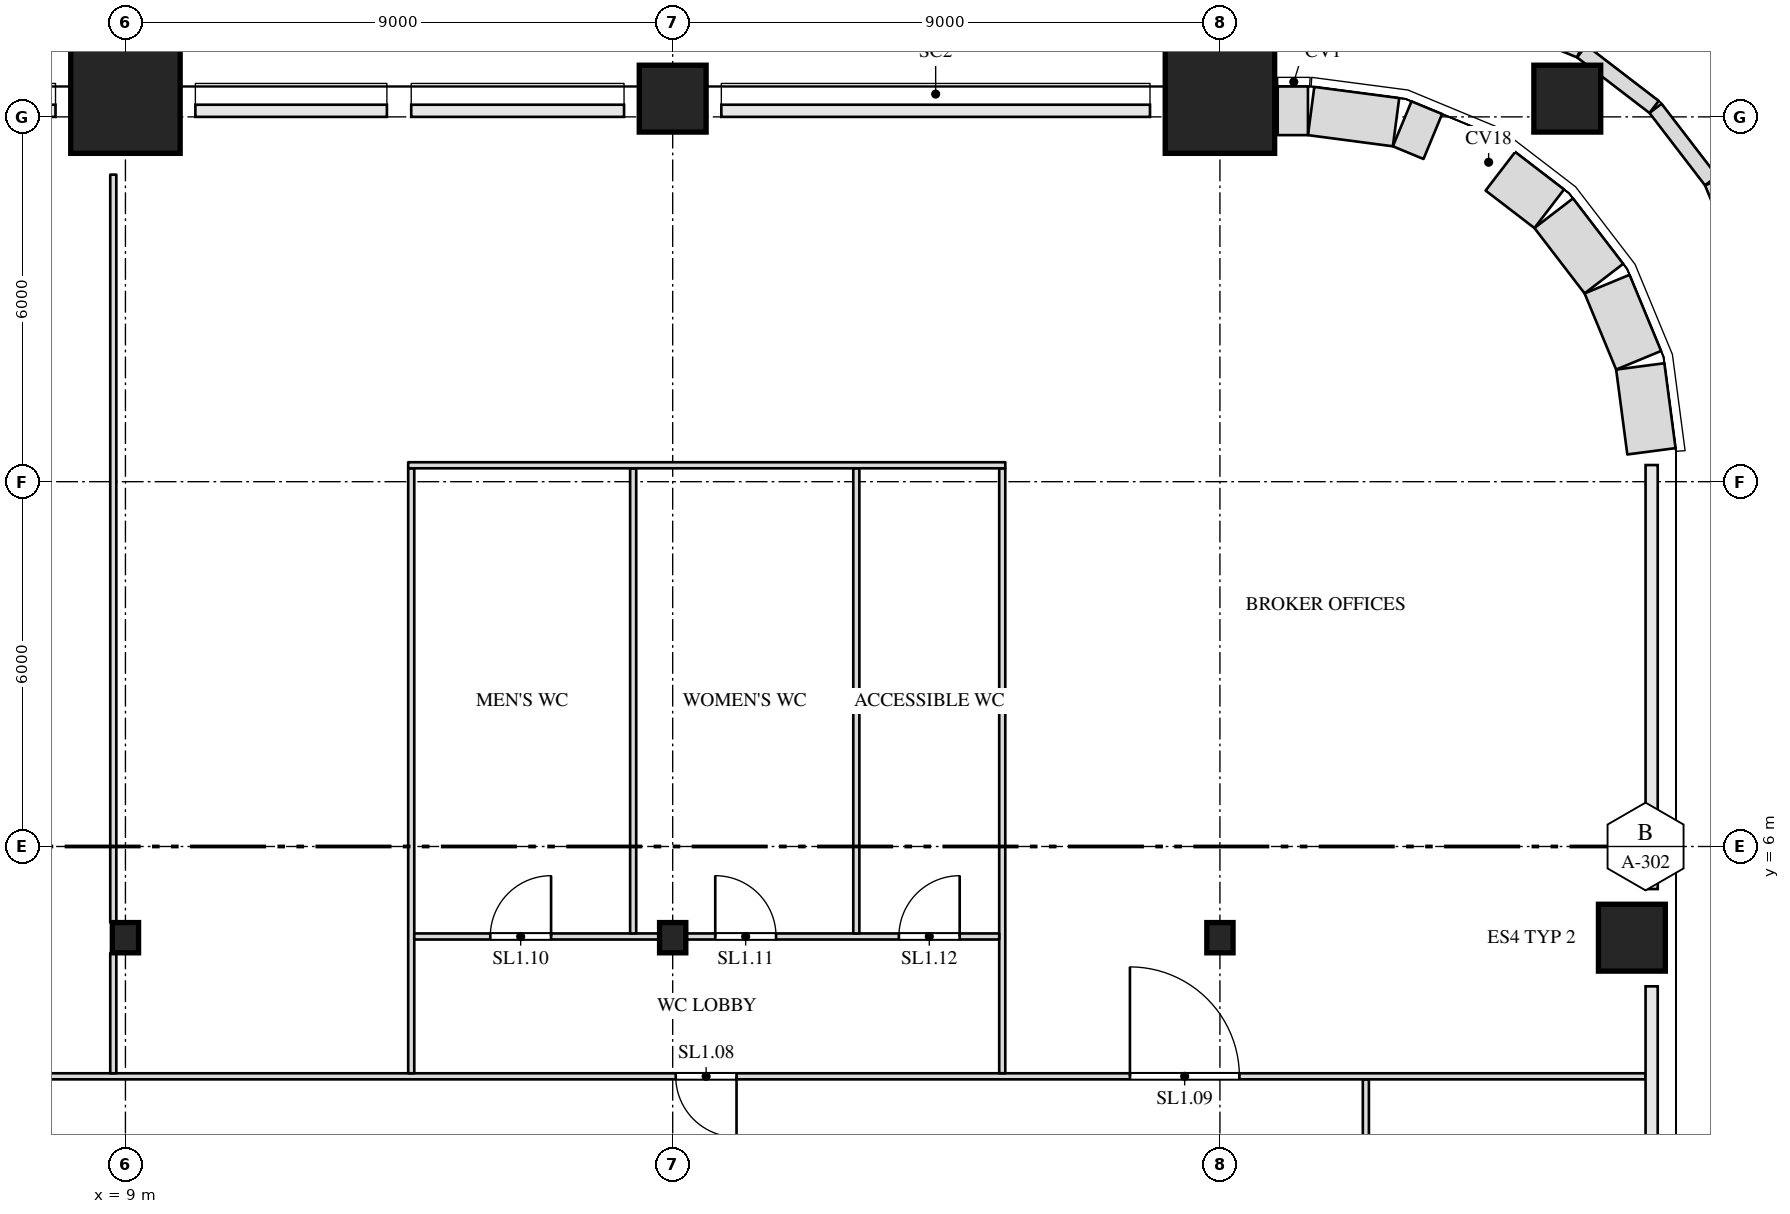
"""IFC4 building model, lengths in metres.
Left out: names, types, materials, properties, quantities, classifications, styles, units other than length and angle.
Written with IfcOpenShell. Run it as: python <this file> out.ifc"""

import sys

from ifc_helpers import new_model, si_unit, direction, frame, frame_2d, origin, origin_2d, place, context, subcontext, project, spatial, rectangle, i_section, extrude, clip, halfspace, element, fill, save


model = new_model("IFC4")
c1 = context("Model", 3, precision=1e-05, world=origin(), true_north=direction((0.0, 1.0)))
c2 = subcontext(c1, "Body", "Model", "MODEL_VIEW")
j1 = project(units=[si_unit("LENGTHUNIT", "METRE"), si_unit("PLANEANGLEUNIT", "RADIAN")], contexts=[c1])
p1 = place(None, origin())
s1 = spatial("IfcSite", under=j1, at=p1, CompositionType="ELEMENT")
p2 = place(p1, origin())
s2 = spatial("IfcBuilding", under=s1, at=p2, CompositionType="ELEMENT")
p3 = place(p2, frame((0.0, 0.0, 100.5)))
s3 = spatial("IfcBuildingStorey", under=s2, at=p3, CompositionType="ELEMENT", Elevation=100.5)
for number, where, z_axis, x_axis in (
    (1, (9.0, 4.5, 0.0), (0.0, 0.0, 1.0), (1.0, 0.0, 0.0)),
    (2, (18.0, 4.5, 0.0), (0.0, 0.0, 1.0), (1.0, 0.0, 0.0)),
    (3, (27.0, 4.5, 0.0), (0.0, 0.0, 1.0), (1.0, 0.0, 0.0)),
):
    element("IfcColumn", number, at=place(p3, frame(where, z_axis=z_axis, x_axis=x_axis)), inside=s3, PredefinedType="COLUMN", context=c2, shape_type="SweptSolid", body=[
        extrude(i_section(OverallWidth=0.432, OverallDepth=0.498, WebThickness=0.056, FlangeThickness=0.089, at=origin_2d()), origin(), (0.0, 0.0, 1.0), 4.0),
    ])
p4 = place(p3, frame((32.5, 4.5, 0.0), z_axis=(0.728199992693, 0.0, 0.685364699005), x_axis=(0.0, 1.0, 0.0)))
e4 = element("IfcColumn", 4, at=p4, inside=s3, PredefinedType="COLUMN", context=c2, shape_type="Clipping", body=[
    clip(extrude(rectangle(XDim=1.1, YDim=1.1, at=origin_2d()), origin(), (0.0, 0.0, 1.0), 5.836), halfspace(frame((0.0, 0.0, 0.584)), True)),
])
p5 = place(p3, frame((9.0, 18.0, 0.0), z_axis=(0.0, 0.242535625036, 0.970142500145), x_axis=(-1.0, 0.0, 0.0)))
e5 = element("IfcColumn", 5, at=p5, inside=s3, PredefinedType="COLUMN", context=c2, shape_type="Clipping", body=[
    clip(extrude(rectangle(XDim=1.8, YDim=1.8, at=origin_2d()), origin(), (0.0, 0.0, 1.0), 4.123), halfspace(frame((0.0, 0.0, 0.225)), True)),
])
p6 = place(p3, frame((18.0, 18.0, 0.0), z_axis=(0.0, 0.242535625036, 0.970142500145), x_axis=(-1.0, 0.0, 0.0)))
e6 = element("IfcColumn", 6, at=p6, inside=s3, PredefinedType="COLUMN", context=c2, shape_type="Clipping", body=[
    clip(extrude(rectangle(XDim=1.1, YDim=1.1, at=origin_2d()), origin(), (0.0, 0.0, 1.0), 4.123), halfspace(frame((0.0, 0.0, 0.137)), True)),
])
p7 = place(p3, frame((27.0, 18.0, 0.0), z_axis=(0.0, 0.242535625036, 0.970142500145), x_axis=(-1.0, 0.0, 0.0)))
e7 = element("IfcColumn", 7, at=p7, inside=s3, PredefinedType="COLUMN", context=c2, shape_type="Clipping", body=[
    clip(extrude(rectangle(XDim=1.8, YDim=1.8, at=origin_2d()), origin(), (0.0, 0.0, 1.0), 4.123), halfspace(frame((0.0, 0.0, 0.225)), True)),
])
p8 = place(p3, frame((31.25, 18.0, 0.0), z_axis=(0.76353256999, 0.156622065639, 0.626488262556), x_axis=(-0.200944143721, 0.979602700641, 0.0)))
e8 = element("IfcColumn", 8, at=p8, inside=s3, PredefinedType="COLUMN", context=c2, shape_type="Clipping", body=[
    clip(extrude(rectangle(XDim=1.1, YDim=1.1, at=origin_2d()), origin(), (0.0, 0.0, 1.0), 6.385), halfspace(frame((0.0, 0.0, 0.684)), True)),
])
p9 = place(p3, frame((29.4, -13.95, 0.0), z_axis=(0.0, 0.0, 1.0), x_axis=(0.0, 1.0, 0.0)))
e9 = element("IfcWall", 9, at=p9, inside=s3, PredefinedType="PARTITIONING", context=c2, shape_type="SweptSolid", body=[
    extrude(rectangle(XDim=16.12, YDim=0.1, at=frame_2d((8.06, 0.0))), origin(), (0.0, 0.0, 1.0), 3.65),
])
p10 = place(p9, frame((7.55, 0.0, 0.0)))
e10 = element("IfcOpeningElement", 10, at=p10, cuts=e9, PredefinedType="OPENING", context=c2, shape_type="SweptSolid", body=[
    extrude(rectangle(XDim=1.0, YDim=2.1, at=frame_2d((0.5, 1.05))), frame((0.0, 0.062, 0.0), z_axis=(0.0, -1.0, 0.0), x_axis=(1.0, 0.0, 0.0)), (0.0, 0.0, 1.0), 0.124),
])
p11 = place(p3, frame((-33.98, 2.22, 0.0), z_axis=(0.0, 0.0, 1.0), x_axis=(1.0, 0.0, 0.0)))
e11 = element("IfcWall", 11, at=p11, inside=s3, PredefinedType="PARTITIONING", context=c2, shape_type="SweptSolid", body=[
    extrude(rectangle(XDim=67.976, YDim=0.1, at=frame_2d((33.988, 0.0))), origin(), (0.0, 0.0, 1.0), 3.65),
])
p12 = place(p11, frame((9.08, 0.0, 0.0)))
e12 = element("IfcOpeningElement", 12, at=p12, cuts=e11, PredefinedType="OPENING", context=c2, shape_type="SweptSolid", body=[
    extrude(rectangle(XDim=1.8, YDim=2.1, at=frame_2d((0.9, 1.05))), frame((0.0, 0.062, 0.0), z_axis=(0.0, -1.0, 0.0), x_axis=(1.0, 0.0, 0.0)), (0.0, 0.0, 1.0), 0.124),
])
p13 = place(p11, frame((19.32, 0.0, 0.0)))
e13 = element("IfcOpeningElement", 13, at=p13, cuts=e11, PredefinedType="OPENING", context=c2, shape_type="SweptSolid", body=[
    extrude(rectangle(XDim=1.8, YDim=2.1, at=frame_2d((0.9, 1.05))), frame((0.0, 0.062, 0.0), z_axis=(0.0, -1.0, 0.0), x_axis=(1.0, 0.0, 0.0)), (0.0, 0.0, 1.0), 0.124),
])
p14 = place(p11, frame((32.98, 0.0, 0.0)))
e14 = element("IfcOpeningElement", 14, at=p14, cuts=e11, PredefinedType="OPENING", context=c2, shape_type="SweptSolid", body=[
    extrude(rectangle(XDim=1.8, YDim=2.1, at=frame_2d((0.9, 1.05))), frame((0.0, 0.062, 0.0), z_axis=(0.0, -1.0, 0.0), x_axis=(1.0, 0.0, 0.0)), (0.0, 0.0, 1.0), 0.124),
])
p15 = place(p11, frame((52.03, 0.0, 0.0)))
e15 = element("IfcOpeningElement", 15, at=p15, cuts=e11, PredefinedType="OPENING", context=c2, shape_type="SweptSolid", body=[
    extrude(rectangle(XDim=1.0, YDim=2.1, at=frame_2d((0.5, 1.05))), frame((0.0, 0.062, 0.0), z_axis=(0.0, -1.0, 0.0), x_axis=(1.0, 0.0, 0.0)), (0.0, 0.0, 1.0), 0.124),
])
p16 = place(p11, frame((59.5, 0.0, 0.0)))
e16 = element("IfcOpeningElement", 16, at=p16, cuts=e11, PredefinedType="OPENING", context=c2, shape_type="SweptSolid", body=[
    extrude(rectangle(XDim=1.8, YDim=2.1, at=frame_2d((0.9, 1.05))), frame((0.0, 0.062, 0.0), z_axis=(0.0, -1.0, 0.0), x_axis=(1.0, 0.0, 0.0)), (0.0, 0.0, 1.0), 0.124),
])
p17 = place(p3, frame((8.8, 2.27, 0.0), z_axis=(0.0, 0.0, 1.0), x_axis=(0.0, 1.0, 0.0)))
e17 = element("IfcWall", 17, at=p17, inside=s3, PredefinedType="PARTITIONING", context=c2, shape_type="SweptSolid", body=[
    extrude(rectangle(XDim=1.981, YDim=0.1, at=frame_2d((0.99, 0.0))), origin(), (0.0, 0.0, 1.0), 3.65),
])
p18 = place(p3, frame((8.8, 4.749, 0.0), z_axis=(0.0, 0.0, 1.0), x_axis=(0.0, 1.0, 0.0)))
e18 = element("IfcWall", 18, at=p18, inside=s3, PredefinedType="PARTITIONING", context=c2, shape_type="SweptSolid", body=[
    extrude(rectangle(XDim=12.301, YDim=0.1, at=frame_2d((6.15, 0.0))), origin(), (0.0, 0.0, 1.0), 3.65),
])
for number, where, z_axis, x_axis in (
    (19, (13.7, 2.27, 0.0), (0.0, 0.0, 1.0), (0.0, 1.0, 0.0)),
    (20, (23.42, 2.27, 0.0), (0.0, 0.0, 1.0), (0.0, 1.0, 0.0)),
):
    element("IfcWall", number, at=place(p3, frame(where, z_axis=z_axis, x_axis=x_axis)), inside=s3, PredefinedType="PARTITIONING", context=c2, shape_type="SweptSolid", body=[
        extrude(rectangle(XDim=9.95, YDim=0.1, at=frame_2d((4.975, 0.0))), origin(), (0.0, 0.0, 1.0), 3.65),
    ])
p19 = place(p3, frame((13.75, 4.52, 0.0), z_axis=(0.0, 0.0, 1.0), x_axis=(1.0, 0.0, 0.0)))
e21 = element("IfcWall", 21, at=p19, inside=s3, PredefinedType="PARTITIONING", context=c2, shape_type="SweptSolid", body=[
    extrude(rectangle(XDim=4.034, YDim=0.1, at=frame_2d((2.017, 0.0))), origin(), (0.0, 0.0, 1.0), 3.038),
])
p20 = place(p19, frame((1.25, 0.0, 0.0)))
e22 = element("IfcOpeningElement", 22, at=p20, cuts=e21, PredefinedType="OPENING", context=c2, shape_type="SweptSolid", body=[
    extrude(rectangle(XDim=1.0, YDim=2.1, at=frame_2d((0.5, 1.05))), frame((0.0, 0.062, 0.0), z_axis=(0.0, -1.0, 0.0), x_axis=(1.0, 0.0, 0.0)), (0.0, 0.0, 1.0), 0.124),
])
p21 = place(p3, frame((18.216, 4.52, 0.0), z_axis=(0.0, 0.0, 1.0), x_axis=(1.0, 0.0, 0.0)))
e23 = element("IfcWall", 23, at=p21, inside=s3, PredefinedType="PARTITIONING", context=c2, shape_type="SweptSolid", body=[
    extrude(rectangle(XDim=5.154, YDim=0.1, at=frame_2d((2.577, 0.0))), origin(), (0.0, 0.0, 1.0), 3.038),
])
p22 = place(p21, frame((0.484, 0.0, 0.0)))
e24 = element("IfcOpeningElement", 24, at=p22, cuts=e23, PredefinedType="OPENING", context=c2, shape_type="SweptSolid", body=[
    extrude(rectangle(XDim=1.0, YDim=2.1, at=frame_2d((0.5, 1.05))), frame((0.0, 0.062, 0.0), z_axis=(0.0, -1.0, 0.0), x_axis=(1.0, 0.0, 0.0)), (0.0, 0.0, 1.0), 0.124),
])
p23 = place(p21, frame((3.504, 0.0, 0.0)))
e25 = element("IfcOpeningElement", 25, at=p23, cuts=e23, PredefinedType="OPENING", context=c2, shape_type="SweptSolid", body=[
    extrude(rectangle(XDim=1.0, YDim=2.1, at=frame_2d((0.5, 1.05))), frame((0.0, 0.062, 0.0), z_axis=(0.0, -1.0, 0.0), x_axis=(1.0, 0.0, 0.0)), (0.0, 0.0, 1.0), 0.124),
])
for number, where, z_axis, x_axis in (
    (26, (17.35, 4.57, 0.0), (0.0, 0.0, 1.0), (0.0, 1.0, 0.0)),
    (27, (21.02, 4.57, 0.0), (0.0, 0.0, 1.0), (0.0, 1.0, 0.0)),
):
    element("IfcWall", number, at=place(p3, frame(where, z_axis=z_axis, x_axis=x_axis)), inside=s3, PredefinedType="PARTITIONING", context=c2, shape_type="SweptSolid", body=[
        extrude(rectangle(XDim=7.65, YDim=0.1, at=frame_2d((3.825, 0.0))), origin(), (0.0, 0.0, 1.0), 3.65),
    ])
p24 = place(p3, frame((13.65, 12.27, 0.0), z_axis=(0.0, 0.0, 1.0), x_axis=(1.0, 0.0, 0.0)))
e28 = element("IfcWall", 28, at=p24, inside=s3, PredefinedType="PARTITIONING", context=c2, shape_type="SweptSolid", body=[
    extrude(rectangle(XDim=9.82, YDim=0.1, at=frame_2d((4.91, 0.0))), origin(), (0.0, 0.0, 1.0), 3.65),
])
p25 = place(p3, frame((34.097, 12.5, 0.0), z_axis=(0.0, 0.0, 1.0), x_axis=(-0.130517283865, 0.99144603414, 0.0)))
e29 = element("IfcWall", 29, at=p25, inside=s3, PredefinedType="SOLIDWALL", context=c2, shape_type="SweptSolid", body=[
    extrude(rectangle(XDim=1.408, YDim=0.8, at=frame_2d((0.704, 0.0))), origin(), (0.0, 0.0, 1.0), 3.65),
])
p26 = place(p3, frame((33.886, 13.997, 0.0), z_axis=(0.0, 0.0, 1.0), x_axis=(-0.38276009378, 0.923847774587, 0.0)))
e30 = element("IfcWall", 30, at=p26, inside=s3, PredefinedType="SOLIDWALL", context=c2, shape_type="SweptSolid", body=[
    extrude(rectangle(XDim=1.355, YDim=0.8, at=frame_2d((0.678, 0.0))), origin(), (0.0, 0.0, 1.0), 3.65),
])
p27 = place(p3, frame((33.315, 15.34, 0.0), z_axis=(0.0, 0.0, 1.0), x_axis=(-0.608866226366, 0.793272915452, 0.0)))
e31 = element("IfcWall", 31, at=p27, inside=s3, PredefinedType="SOLIDWALL", context=c2, shape_type="SweptSolid", body=[
    extrude(rectangle(XDim=1.356, YDim=0.8, at=frame_2d((0.678, 0.0))), origin(), (0.0, 0.0, 1.0), 3.65),
])
p28 = place(p3, frame((32.416, 16.489, 0.0), z_axis=(0.0, 0.0, 1.0), x_axis=(-0.793206378566, 0.608952905406, 0.0)))
e32 = element("IfcWall", 32, at=p28, inside=s3, PredefinedType="SOLIDWALL", context=c2, shape_type="SweptSolid", body=[
    extrude(rectangle(XDim=1.012, YDim=0.8, at=frame_2d((0.506, 0.0))), origin(), (0.0, 0.0, 1.0), 3.65),
])
p29 = place(p3, frame((30.501, 17.677, 0.0), z_axis=(0.0, 0.0, 1.0), x_axis=(-0.923738247693, 0.383024346158, 0.0)))
e33 = element("IfcWall", 33, at=p29, inside=s3, PredefinedType="SOLIDWALL", context=c2, shape_type="SweptSolid", body=[
    extrude(rectangle(XDim=0.545, YDim=0.8, at=frame_2d((0.272, 0.0))), origin(), (0.0, 0.0, 1.0), 3.65),
])
p30 = place(p3, frame((29.896, 17.913, 0.0), z_axis=(0.0, 0.0, 1.0), x_axis=(-0.99144603414, 0.130517283865, 0.0)))
e34 = element("IfcWall", 34, at=p30, inside=s3, PredefinedType="SOLIDWALL", context=c2, shape_type="SweptSolid", body=[
    extrude(rectangle(XDim=1.408, YDim=0.8, at=frame_2d((0.704, 0.0))), origin(), (0.0, 0.0, 1.0), 3.65),
])
p31 = place(p3, frame((28.448, 18.1, 0.0), z_axis=(0.0, 0.0, 1.0), x_axis=(-1.0, 0.0, 0.0)))
e35 = element("IfcWall", 35, at=p31, inside=s3, PredefinedType="SOLIDWALL", context=c2, shape_type="SweptSolid", body=[
    extrude(rectangle(XDim=0.498, YDim=0.8, at=frame_2d((0.249, 0.0))), origin(), (0.0, 0.0, 1.0), 3.65),
])
for number, where, z_axis, x_axis in (
    (36, (35.667, 15.535, 0.0), (0.0, 0.0, 1.0), (-0.383, 0.924, 0.0)),
    (37, (35.077, 16.95, 0.0), (0.0, 0.0, 1.0), (-0.609, 0.793, 0.0)),
    (38, (34.14, 18.164, 0.0), (0.0, 0.0, 1.0), (-0.793, 0.609, 0.0)),
    (39, (32.922, 19.093, 0.0), (0.0, 0.0, 1.0), (-0.924, 0.383, 0.0)),
):
    element("IfcWall", number, at=place(p3, frame(where, z_axis=z_axis, x_axis=x_axis)), inside=s3, PredefinedType="PARAPET", context=c2, shape_type="SweptSolid", body=[
        extrude(rectangle(XDim=1.5, YDim=0.25, at=frame_2d((0.75, 0.0))), origin(), (0.0, 0.0, 1.0), 1.1),
    ])
p32 = place(p15, origin())
e40 = element("IfcDoor", 40, at=p32, inside=s3, OperationType="SINGLE_SWING_LEFT", PredefinedType="DOOR", context=c2, shape_type="SweptSolid", body=[
    extrude(rectangle(XDim=1.0, YDim=2.1, at=frame_2d((0.5, 1.05))), frame((0.0, 0.025, 0.0), z_axis=(0.0, -1.0, 0.0), x_axis=(1.0, 0.0, 0.0)), (0.0, 0.0, 1.0), 0.05),
])
fill(e15, e40)
p33 = place(p16, origin())
e41 = element("IfcDoor", 41, at=p33, inside=s3, OperationType="DOUBLE_DOOR_SINGLE_SWING", PredefinedType="DOOR", context=c2, shape_type="SweptSolid", body=[
    extrude(rectangle(XDim=1.8, YDim=2.1, at=frame_2d((0.9, 1.05))), frame((0.0, 0.025, 0.0), z_axis=(0.0, -1.0, 0.0), x_axis=(1.0, 0.0, 0.0)), (0.0, 0.0, 1.0), 0.05),
])
fill(e16, e41)
p34 = place(p20, origin())
e42 = element("IfcDoor", 42, at=p34, inside=s3, OperationType="SINGLE_SWING_RIGHT", PredefinedType="DOOR", context=c2, shape_type="SweptSolid", body=[
    extrude(rectangle(XDim=1.0, YDim=2.1, at=frame_2d((0.5, 1.05))), frame((0.0, 0.025, 0.0), z_axis=(0.0, -1.0, 0.0), x_axis=(1.0, 0.0, 0.0)), (0.0, 0.0, 1.0), 0.05),
])
fill(e22, e42)
p35 = place(p22, origin())
e43 = element("IfcDoor", 43, at=p35, inside=s3, OperationType="SINGLE_SWING_LEFT", PredefinedType="DOOR", context=c2, shape_type="SweptSolid", body=[
    extrude(rectangle(XDim=1.0, YDim=2.1, at=frame_2d((0.5, 1.05))), frame((0.0, 0.025, 0.0), z_axis=(0.0, -1.0, 0.0), x_axis=(1.0, 0.0, 0.0)), (0.0, 0.0, 1.0), 0.05),
])
fill(e24, e43)
p36 = place(p23, origin())
e44 = element("IfcDoor", 44, at=p36, inside=s3, OperationType="SINGLE_SWING_RIGHT", PredefinedType="DOOR", context=c2, shape_type="SweptSolid", body=[
    extrude(rectangle(XDim=1.0, YDim=2.1, at=frame_2d((0.5, 1.05))), frame((0.0, 0.025, 0.0), z_axis=(0.0, -1.0, 0.0), x_axis=(1.0, 0.0, 0.0)), (0.0, 0.0, 1.0), 0.05),
])
fill(e25, e44)
save(model, sys.argv[1])
